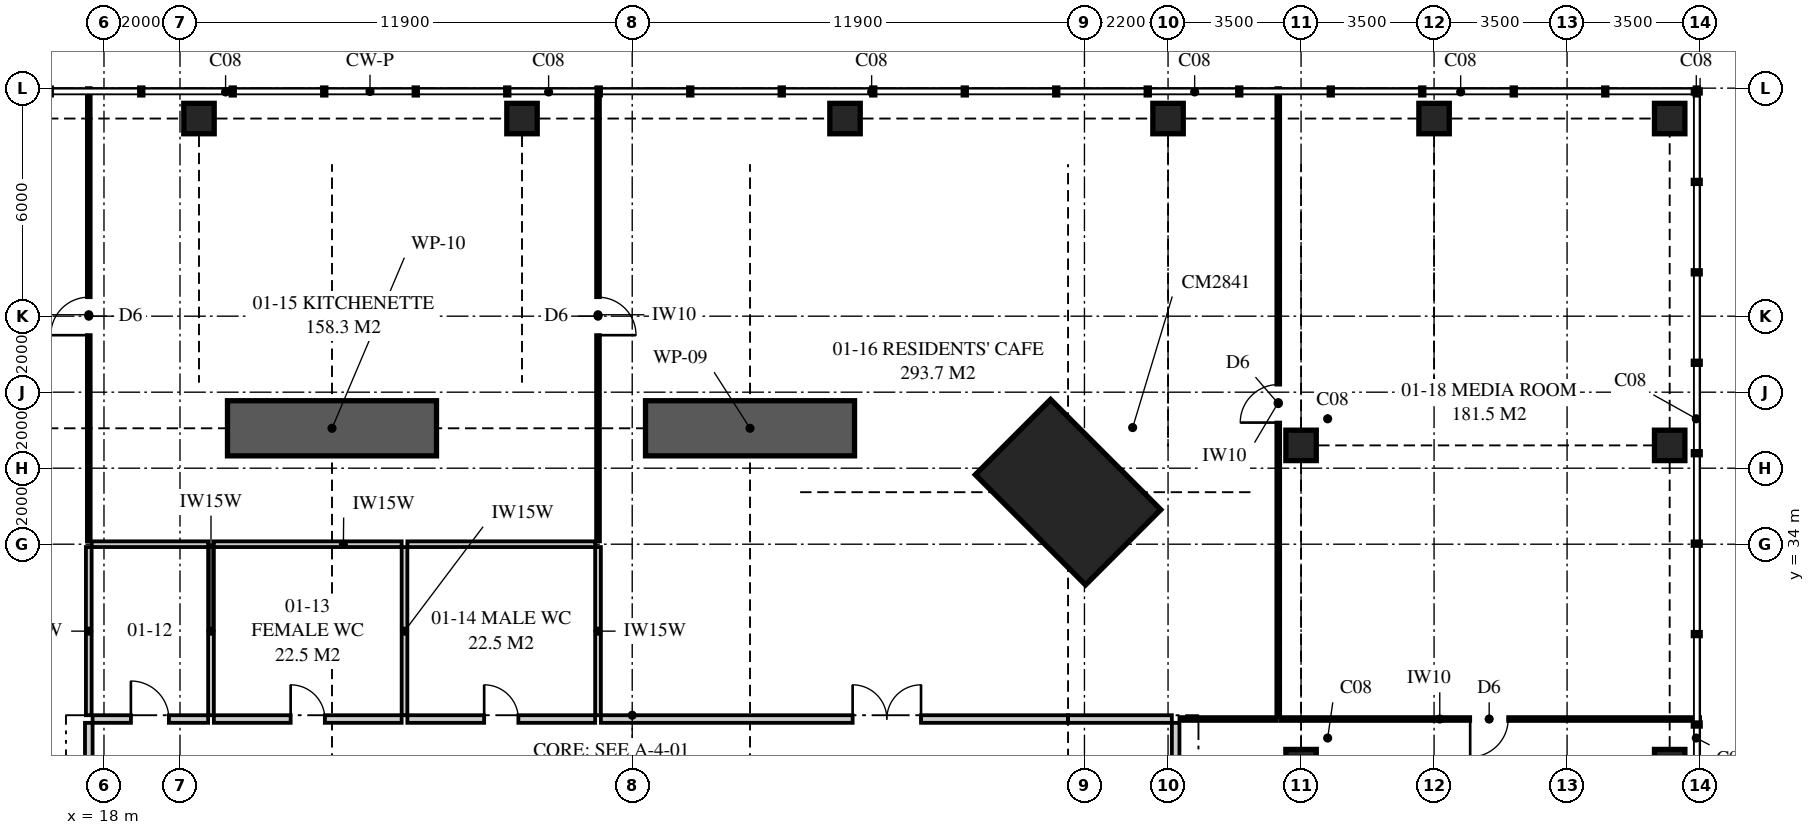
"""IFC4 building model, lengths in metres.
Left out: names, types, materials, properties, quantities, classifications, styles, units other than length and angle.
Written with IfcOpenShell. Run it as: python <this file> out.ifc"""

import sys

from ifc_helpers import new_model, si_unit, direction, frame, frame_2d, origin, origin_2d, place, context, subcontext, project, spatial, polyline, rectangle, outline, extrude, element, fill, save


model = new_model("IFC4")
c1 = context("Model", 3, precision=1e-05, world=origin(), true_north=direction((0.0, 1.0)))
c2 = subcontext(c1, "Body", "Model", "MODEL_VIEW")
j1 = project(units=[si_unit("LENGTHUNIT", "METRE"), si_unit("PLANEANGLEUNIT", "RADIAN")], contexts=[c1])
p1 = place(None, origin())
s1 = spatial("IfcSite", under=j1, at=p1, CompositionType="ELEMENT")
p2 = place(p1, origin())
s2 = spatial("IfcBuilding", under=s1, at=p2, CompositionType="ELEMENT")
p3 = place(p2, frame((0.0, 0.0, 6.0)))
s3 = spatial("IfcBuildingStorey", under=s2, at=p3, CompositionType="ELEMENT", Elevation=6.0)
p4 = place(p3, frame((43.369, 35.369, 0.0), z_axis=(0.0, 0.0, 1.0), x_axis=(-0.707106781187, -0.707106781187, 0.0)))
e1 = element("IfcColumn", 1, at=p4, inside=s3, PredefinedType="COLUMN", context=c2, shape_type="SweptSolid", body=[
    extrude(rectangle(XDim=2.8, YDim=4.1, at=origin_2d()), origin(), (0.0, 0.0, 1.0), 5.0),
])
for number, where, z_axis, x_axis in (
    (2, (49.5, 28.2, 0.0), (0.0, 0.0, 1.0), (1.0, 0.0, 0.0)),
    (3, (59.2, 28.2, 0.0), (0.0, 0.0, 1.0), (1.0, 0.0, 0.0)),
    (4, (49.5, 36.6, 0.0), (0.0, 0.0, 1.0), (1.0, 0.0, 0.0)),
    (5, (59.2, 36.6, 0.0), (0.0, 0.0, 1.0), (1.0, 0.0, 0.0)),
    (6, (20.5, 45.2, 0.0), (0.0, 0.0, 1.0), (1.0, 0.0, 0.0)),
    (7, (29.0, 45.2, 0.0), (0.0, 0.0, 1.0), (1.0, 0.0, 0.0)),
    (8, (37.5, 45.2, 0.0), (0.0, 0.0, 1.0), (1.0, 0.0, 0.0)),
    (9, (46.0, 45.2, 0.0), (0.0, 0.0, 1.0), (1.0, 0.0, 0.0)),
    (10, (53.0, 45.2, 0.0), (0.0, 0.0, 1.0), (1.0, 0.0, 0.0)),
    (11, (59.2, 45.2, 0.0), (0.0, 0.0, 1.0), (1.0, 0.0, 0.0)),
):
    element("IfcColumn", number, at=place(p3, frame(where, z_axis=z_axis, x_axis=x_axis)), inside=s3, PredefinedType="COLUMN", context=c2, shape_type="SweptSolid", body=[
        extrude(rectangle(XDim=0.8, YDim=0.8, at=origin_2d()), origin(), (0.0, 0.0, 1.0), 5.0),
    ])
p5 = place(p3, frame((17.6, 27.75, 0.0), z_axis=(0.0, 0.0, 1.0), x_axis=(0.0, 1.0, 0.0)))
e12 = element("IfcWall", 12, at=p5, inside=s3, PredefinedType="PARTITIONING", context=c2, shape_type="SweptSolid", body=[
    extrude(rectangle(XDim=1.55, YDim=0.2, at=frame_2d((0.775, 0.0))), origin(), (0.0, 0.0, 1.0), 4.72),
])
p6 = place(p3, frame((17.6, 29.5, 0.0), z_axis=(0.0, 0.0, 1.0), x_axis=(0.0, 1.0, 0.0)))
e13 = element("IfcWall", 13, at=p6, inside=s3, PredefinedType="PLUMBINGWALL", context=c2, shape_type="SweptSolid", body=[
    extrude(rectangle(XDim=4.425, YDim=0.15, at=frame_2d((2.212, 0.0))), origin(), (0.0, 0.0, 1.0), 4.72),
])
p7 = place(p3, frame((17.6, 34.075, 0.0), z_axis=(0.0, 0.0, 1.0), x_axis=(0.0, 1.0, 0.0)))
e14 = element("IfcWall", 14, at=p7, inside=s3, PredefinedType="PARTITIONING", context=c2, shape_type="SweptSolid", body=[
    extrude(outline(polyline([(0.0, 0.0), (11.925, 0.0), (11.925, 4.72), (11.925, 4.12), (9.865, 4.12), (9.865, 4.72), (4.235, 4.72), (4.235, 4.12), (1.715, 4.12), (1.715, 4.72), (0.0, 4.72), (0.0, 0.0)])), frame((0.0, 0.05, 0.0), z_axis=(0.0, -1.0, 0.0), x_axis=(1.0, 0.0, 0.0)), (0.0, 0.0, 1.0), 0.1),
])
p8 = place(p7, frame((5.425, 0.0, 0.0)))
e15 = element("IfcOpeningElement", 15, at=p8, cuts=e14, PredefinedType="OPENING", context=c2, shape_type="SweptSolid", body=[
    extrude(rectangle(XDim=1.0, YDim=2.1, at=frame_2d((0.5, 1.05))), frame((0.0, 0.06, 0.0), z_axis=(0.0, -1.0, 0.0), x_axis=(1.0, 0.0, 0.0)), (0.0, 0.0, 1.0), 0.12),
])
p9 = place(p3, frame((17.7, 29.4, 0.0), z_axis=(0.0, 0.0, 1.0), x_axis=(1.0, 0.0, 0.0)))
e16 = element("IfcWall", 16, at=p9, inside=s3, PredefinedType="PARTITIONING", context=c2, shape_type="SweptSolid", body=[
    extrude(rectangle(XDim=3.041, YDim=0.2, at=frame_2d((1.521, 0.0))), origin(), (0.0, 0.0, 1.0), 4.72),
])
p10 = place(p9, frame((1.008, 0.0, 0.0)))
e17 = element("IfcOpeningElement", 17, at=p10, cuts=e16, PredefinedType="OPENING", context=c2, shape_type="SweptSolid", body=[
    extrude(rectangle(XDim=1.0, YDim=2.1, at=frame_2d((0.5, 1.05))), frame((0.0, 0.11, 0.0), z_axis=(0.0, -1.0, 0.0), x_axis=(1.0, 0.0, 0.0)), (0.0, 0.0, 1.0), 0.22),
])
p11 = place(p3, frame((20.891, 29.4, 0.0), z_axis=(0.0, 0.0, 1.0), x_axis=(1.0, 0.0, 0.0)))
e18 = element("IfcWall", 18, at=p11, inside=s3, PredefinedType="PARTITIONING", context=c2, shape_type="SweptSolid", body=[
    extrude(outline(polyline([(0.0, 0.0), (4.942, 0.0), (4.942, 4.72), (4.419, 4.72), (4.419, 4.12), (1.799, 4.12), (1.799, 4.72), (0.0, 4.72), (0.0, 0.0)])), frame((0.0, 0.1, 0.0), z_axis=(0.0, -1.0, 0.0), x_axis=(1.0, 0.0, 0.0)), (0.0, 0.0, 1.0), 0.2),
])
p12 = place(p11, frame((2.021, 0.0, 0.0)))
e19 = element("IfcOpeningElement", 19, at=p12, cuts=e18, PredefinedType="OPENING", context=c2, shape_type="SweptSolid", body=[
    extrude(rectangle(XDim=0.9, YDim=2.1, at=frame_2d((0.45, 1.05))), frame((0.0, 0.11, 0.0), z_axis=(0.0, -1.0, 0.0), x_axis=(1.0, 0.0, 0.0)), (0.0, 0.0, 1.0), 0.22),
])
p13 = place(p3, frame((25.983, 29.4, 0.0), z_axis=(0.0, 0.0, 1.0), x_axis=(1.0, 0.0, 0.0)))
e20 = element("IfcWall", 20, at=p13, inside=s3, PredefinedType="PARTITIONING", context=c2, shape_type="SweptSolid", body=[
    extrude(rectangle(XDim=4.942, YDim=0.2, at=frame_2d((2.471, 0.0))), origin(), (0.0, 0.0, 1.0), 4.72),
])
p14 = place(p13, frame((2.021, 0.0, 0.0)))
e21 = element("IfcOpeningElement", 21, at=p14, cuts=e20, PredefinedType="OPENING", context=c2, shape_type="SweptSolid", body=[
    extrude(rectangle(XDim=0.9, YDim=2.1, at=frame_2d((0.45, 1.05))), frame((0.0, 0.11, 0.0), z_axis=(0.0, -1.0, 0.0), x_axis=(1.0, 0.0, 0.0)), (0.0, 0.0, 1.0), 0.22),
])
p15 = place(p3, frame((31.075, 29.4, 0.0), z_axis=(0.0, 0.0, 1.0), x_axis=(1.0, 0.0, 0.0)))
e22 = element("IfcWall", 22, at=p15, inside=s3, PredefinedType="PARTITIONING", context=c2, shape_type="SweptSolid", body=[
    extrude(outline(polyline([(0.0, 0.0), (12.294, 0.0), (12.294, 4.12), (10.984, 4.12), (10.984, 4.72), (5.235, 4.72), (5.235, 4.12), (2.615, 4.12), (2.615, 4.72), (0.0, 4.72), (0.0, 0.0)])), frame((0.0, 0.1, 0.0), z_axis=(0.0, -1.0, 0.0), x_axis=(1.0, 0.0, 0.0)), (0.0, 0.0, 1.0), 0.2),
])
p16 = place(p15, frame((6.625, 0.0, 0.0)))
e23 = element("IfcOpeningElement", 23, at=p16, cuts=e22, PredefinedType="OPENING", context=c2, shape_type="SweptSolid", body=[
    extrude(rectangle(XDim=1.8, YDim=2.1, at=frame_2d((0.9, 1.05))), frame((0.0, 0.11, 0.0), z_axis=(0.0, -1.0, 0.0), x_axis=(1.0, 0.0, 0.0)), (0.0, 0.0, 1.0), 0.22),
])
p17 = place(p3, frame((43.369, 29.4, 0.0), z_axis=(0.0, 0.0, 1.0), x_axis=(1.0, 0.0, 0.0)))
e24 = element("IfcWall", 24, at=p17, inside=s3, PredefinedType="PARTITIONING", context=c2, shape_type="SweptSolid", body=[
    extrude(rectangle(XDim=2.731, YDim=0.2, at=frame_2d((1.366, 0.0))), origin(), (0.0, 0.0, 1.0), 4.12),
])
p18 = place(p3, frame((46.2, 27.75, 0.0), z_axis=(0.0, 0.0, 1.0), x_axis=(0.0, 1.0, 0.0)))
e25 = element("IfcWall", 25, at=p18, inside=s3, PredefinedType="PARTITIONING", context=c2, shape_type="SweptSolid", body=[
    extrude(outline(polyline([(0.0, 0.0), (1.55, 0.0), (1.55, 4.72), (1.55, 4.12), (0.0, 4.12), (0.0, 4.72), (0.0, 0.0)])), frame((0.0, 0.1, 0.0), z_axis=(0.0, -1.0, 0.0), x_axis=(1.0, 0.0, 0.0)), (0.0, 0.0, 1.0), 0.2),
])
p19 = place(p3, frame((20.816, 29.5, 0.0), z_axis=(0.0, 0.0, 1.0), x_axis=(0.0, 1.0, 0.0)))
e26 = element("IfcWall", 26, at=p19, inside=s3, PredefinedType="PLUMBINGWALL", context=c2, shape_type="SweptSolid", body=[
    extrude(rectangle(XDim=4.425, YDim=0.15, at=frame_2d((2.212, 0.0))), origin(), (0.0, 0.0, 1.0), 4.72),
])
p20 = place(p3, frame((17.675, 34.0, 0.0), z_axis=(0.0, 0.0, 1.0), x_axis=(1.0, 0.0, 0.0)))
e27 = element("IfcWall", 27, at=p20, inside=s3, PredefinedType="PLUMBINGWALL", context=c2, shape_type="SweptSolid", body=[
    extrude(rectangle(XDim=3.066, YDim=0.15, at=frame_2d((1.533, 0.0))), origin(), (0.0, 0.0, 1.0), 4.72),
])
p21 = place(p3, frame((25.908, 29.5, 0.0), z_axis=(0.0, 0.0, 1.0), x_axis=(0.0, 1.0, 0.0)))
e28 = element("IfcWall", 28, at=p21, inside=s3, PredefinedType="PLUMBINGWALL", context=c2, shape_type="SweptSolid", body=[
    extrude(rectangle(XDim=4.425, YDim=0.15, at=frame_2d((2.212, 0.0))), origin(), (0.0, 0.0, 1.0), 4.72),
])
p22 = place(p3, frame((20.891, 34.0, 0.0), z_axis=(0.0, 0.0, 1.0), x_axis=(1.0, 0.0, 0.0)))
e29 = element("IfcWall", 29, at=p22, inside=s3, PredefinedType="PLUMBINGWALL", context=c2, shape_type="SweptSolid", body=[
    extrude(outline(polyline([(0.0, 0.0), (4.942, 0.0), (4.942, 4.72), (4.394, 4.72), (4.394, 4.12), (1.824, 4.12), (1.824, 4.72), (0.0, 4.72), (0.0, 0.0)])), frame((0.0, 0.075, 0.0), z_axis=(0.0, -1.0, 0.0), x_axis=(1.0, 0.0, 0.0)), (0.0, 0.0, 1.0), 0.15),
])
p23 = place(p3, frame((25.983, 34.0, 0.0), z_axis=(0.0, 0.0, 1.0), x_axis=(1.0, 0.0, 0.0)))
e30 = element("IfcWall", 30, at=p23, inside=s3, PredefinedType="PLUMBINGWALL", context=c2, shape_type="SweptSolid", body=[
    extrude(rectangle(XDim=4.942, YDim=0.15, at=frame_2d((2.471, 0.0))), origin(), (0.0, 0.0, 1.0), 4.72),
])
p24 = place(p3, frame((31.0, 29.5, 0.0), z_axis=(0.0, 0.0, 1.0), x_axis=(0.0, 1.0, 0.0)))
e31 = element("IfcWall", 31, at=p24, inside=s3, PredefinedType="PLUMBINGWALL", context=c2, shape_type="SweptSolid", body=[
    extrude(rectangle(XDim=4.425, YDim=0.15, at=frame_2d((2.212, 0.0))), origin(), (0.0, 0.0, 1.0), 4.72),
])
p25 = place(p3, frame((31.0, 34.075, 0.0), z_axis=(0.0, 0.0, 1.0), x_axis=(0.0, 1.0, 0.0)))
e32 = element("IfcWall", 32, at=p25, inside=s3, PredefinedType="PARTITIONING", context=c2, shape_type="SweptSolid", body=[
    extrude(outline(polyline([(0.0, 0.0), (11.925, 0.0), (11.925, 4.72), (11.925, 4.12), (9.865, 4.12), (9.865, 4.72), (4.235, 4.72), (4.235, 4.12), (1.715, 4.12), (1.715, 4.72), (0.0, 4.72), (0.0, 0.0)])), frame((0.0, 0.05, 0.0), z_axis=(0.0, -1.0, 0.0), x_axis=(1.0, 0.0, 0.0)), (0.0, 0.0, 1.0), 0.1),
])
p26 = place(p25, frame((5.425, 0.0, 0.0)))
e33 = element("IfcOpeningElement", 33, at=p26, cuts=e32, PredefinedType="OPENING", context=c2, shape_type="SweptSolid", body=[
    extrude(rectangle(XDim=1.0, YDim=2.1, at=frame_2d((0.5, 1.05))), frame((0.0, 0.06, 0.0), z_axis=(0.0, -1.0, 0.0), x_axis=(1.0, 0.0, 0.0)), (0.0, 0.0, 1.0), 0.12),
])
p27 = place(p3, frame((46.3, 29.4, 0.0), z_axis=(0.0, 0.0, 1.0), x_axis=(1.0, 0.0, 0.0)))
e34 = element("IfcWall", 34, at=p27, inside=s3, PredefinedType="PARTITIONING", context=c2, shape_type="SweptSolid", body=[
    extrude(outline(polyline([(0.0, 0.0), (2.55, 0.0), (2.55, 4.72), (2.55, 4.12), (0.0, 4.12), (0.0, 4.72), (0.0, 0.0)])), frame((0.0, 0.05, 0.0), z_axis=(0.0, -1.0, 0.0), x_axis=(1.0, 0.0, 0.0)), (0.0, 0.0, 1.0), 0.1),
])
p28 = place(p3, frame((48.9, 29.45, 0.0), z_axis=(0.0, 0.0, 1.0), x_axis=(0.0, 1.0, 0.0)))
e35 = element("IfcWall", 35, at=p28, inside=s3, PredefinedType="PARTITIONING", context=c2, shape_type="SweptSolid", body=[
    extrude(outline(polyline([(0.0, 0.0), (16.55, 0.0), (16.55, 4.72), (16.55, 4.12), (15.81, 4.12), (7.21, 4.12), (0.01, 4.12), (0.0, 4.12), (0.0, 4.72), (0.0, 0.0)])), frame((0.0, 0.05, 0.0), z_axis=(0.0, -1.0, 0.0), x_axis=(1.0, 0.0, 0.0)), (0.0, 0.0, 1.0), 0.1),
])
p29 = place(p28, frame((7.75, 0.0, 0.0)))
e36 = element("IfcOpeningElement", 36, at=p29, cuts=e35, PredefinedType="OPENING", context=c2, shape_type="SweptSolid", body=[
    extrude(rectangle(XDim=1.0, YDim=2.1, at=frame_2d((0.5, 1.05))), frame((0.0, 0.06, 0.0), z_axis=(0.0, -1.0, 0.0), x_axis=(1.0, 0.0, 0.0)), (0.0, 0.0, 1.0), 0.12),
])
p30 = place(p3, frame((48.95, 29.4, 0.0), z_axis=(0.0, 0.0, 1.0), x_axis=(1.0, 0.0, 0.0)))
e37 = element("IfcWall", 37, at=p30, inside=s3, PredefinedType="PARTITIONING", context=c2, shape_type="SweptSolid", body=[
    extrude(outline(polyline([(0.0, 0.0), (11.05, 0.0), (11.05, 4.72), (11.05, 4.12), (10.31, 4.12), (1.81, 4.12), (0.61, 4.12), (0.0, 4.12), (0.0, 4.72), (0.0, 0.0)])), frame((0.0, 0.05, 0.0), z_axis=(0.0, -1.0, 0.0), x_axis=(1.0, 0.0, 0.0)), (0.0, 0.0, 1.0), 0.1),
])
p31 = place(p30, frame((5.0, 0.0, 0.0)))
e38 = element("IfcOpeningElement", 38, at=p31, cuts=e37, PredefinedType="OPENING", context=c2, shape_type="SweptSolid", body=[
    extrude(rectangle(XDim=1.0, YDim=2.1, at=frame_2d((0.5, 1.05))), frame((0.0, 0.06, 0.0), z_axis=(0.0, -1.0, 0.0), x_axis=(1.0, 0.0, 0.0)), (0.0, 0.0, 1.0), 0.12),
])
for number, where, z_axis, x_axis in (
    (39, (32.25, 37.05, 0.0), (0.0, 0.0, 1.0), (1.0, 0.0, 0.0)),
    (40, (21.25, 37.05, 0.0), (0.0, 0.0, 1.0), (1.0, 0.0, 0.0)),
):
    element("IfcWall", number, at=place(p3, frame(where, z_axis=z_axis, x_axis=x_axis)), inside=s3, PredefinedType="SHEAR", context=c2, shape_type="SweptSolid", body=[
        extrude(rectangle(XDim=5.5, YDim=1.45, at=frame_2d((2.75, 0.0))), origin(), (0.0, 0.0, 1.0), 5.0),
    ])
p32 = place(p29, origin())
e41 = element("IfcDoor", 41, at=p32, inside=s3, OperationType="SINGLE_SWING_LEFT", PredefinedType="DOOR", context=c2, shape_type="SweptSolid", body=[
    extrude(rectangle(XDim=1.0, YDim=2.1, at=frame_2d((0.5, 1.05))), frame((0.0, 0.025, 0.0), z_axis=(0.0, -1.0, 0.0), x_axis=(1.0, 0.0, 0.0)), (0.0, 0.0, 1.0), 0.05),
])
fill(e36, e41)
p33 = place(p10, origin())
e42 = element("IfcDoor", 42, at=p33, inside=s3, OperationType="SINGLE_SWING_LEFT", PredefinedType="DOOR", context=c2, shape_type="SweptSolid", body=[
    extrude(rectangle(XDim=1.0, YDim=2.1, at=frame_2d((0.5, 1.05))), frame((0.0, 0.025, 0.0), z_axis=(0.0, -1.0, 0.0), x_axis=(1.0, 0.0, 0.0)), (0.0, 0.0, 1.0), 0.05),
])
fill(e17, e42)
p34 = place(p12, origin())
e43 = element("IfcDoor", 43, at=p34, inside=s3, OperationType="SINGLE_SWING_LEFT", PredefinedType="DOOR", context=c2, shape_type="SweptSolid", body=[
    extrude(rectangle(XDim=0.9, YDim=2.1, at=frame_2d((0.45, 1.05))), frame((0.0, 0.025, 0.0), z_axis=(0.0, -1.0, 0.0), x_axis=(1.0, 0.0, 0.0)), (0.0, 0.0, 1.0), 0.05),
])
fill(e19, e43)
p35 = place(p14, origin())
e44 = element("IfcDoor", 44, at=p35, inside=s3, OperationType="SINGLE_SWING_LEFT", PredefinedType="DOOR", context=c2, shape_type="SweptSolid", body=[
    extrude(rectangle(XDim=0.9, YDim=2.1, at=frame_2d((0.45, 1.05))), frame((0.0, 0.025, 0.0), z_axis=(0.0, -1.0, 0.0), x_axis=(1.0, 0.0, 0.0)), (0.0, 0.0, 1.0), 0.05),
])
fill(e21, e44)
p36 = place(p26, frame((1.0, 0.0, 0.0), z_axis=(0.0, 0.0, 1.0), x_axis=(-1.0, 0.0, 0.0)))
e45 = element("IfcDoor", 45, at=p36, inside=s3, OperationType="SINGLE_SWING_RIGHT", PredefinedType="DOOR", context=c2, shape_type="SweptSolid", body=[
    extrude(rectangle(XDim=1.0, YDim=2.1, at=frame_2d((0.5, 1.05))), frame((0.0, 0.025, 0.0), z_axis=(0.0, -1.0, 0.0), x_axis=(1.0, 0.0, 0.0)), (0.0, 0.0, 1.0), 0.05),
])
fill(e33, e45)
p37 = place(p8, origin())
e46 = element("IfcDoor", 46, at=p37, inside=s3, OperationType="SINGLE_SWING_LEFT", PredefinedType="DOOR", context=c2, shape_type="SweptSolid", body=[
    extrude(rectangle(XDim=1.0, YDim=2.1, at=frame_2d((0.5, 1.05))), frame((0.0, 0.025, 0.0), z_axis=(0.0, -1.0, 0.0), x_axis=(1.0, 0.0, 0.0)), (0.0, 0.0, 1.0), 0.05),
])
fill(e15, e46)
p38 = place(p16, origin())
e47 = element("IfcDoor", 47, at=p38, inside=s3, OperationType="DOUBLE_DOOR_SINGLE_SWING", PredefinedType="DOOR", context=c2, shape_type="SweptSolid", body=[
    extrude(rectangle(XDim=1.8, YDim=2.1, at=frame_2d((0.9, 1.05))), frame((0.0, 0.025, 0.0), z_axis=(0.0, -1.0, 0.0), x_axis=(1.0, 0.0, 0.0)), (0.0, 0.0, 1.0), 0.05),
])
fill(e23, e47)
p39 = place(p31, frame((1.0, 0.0, 0.0), z_axis=(0.0, 0.0, 1.0), x_axis=(-1.0, 0.0, 0.0)))
e48 = element("IfcDoor", 48, at=p39, inside=s3, OperationType="SINGLE_SWING_RIGHT", PredefinedType="DOOR", context=c2, shape_type="SweptSolid", body=[
    extrude(rectangle(XDim=1.0, YDim=2.1, at=frame_2d((0.5, 1.05))), frame((0.0, 0.025, 0.0), z_axis=(0.0, -1.0, 0.0), x_axis=(1.0, 0.0, 0.0)), (0.0, 0.0, 1.0), 0.05),
])
fill(e38, e48)
save(model, sys.argv[1])
